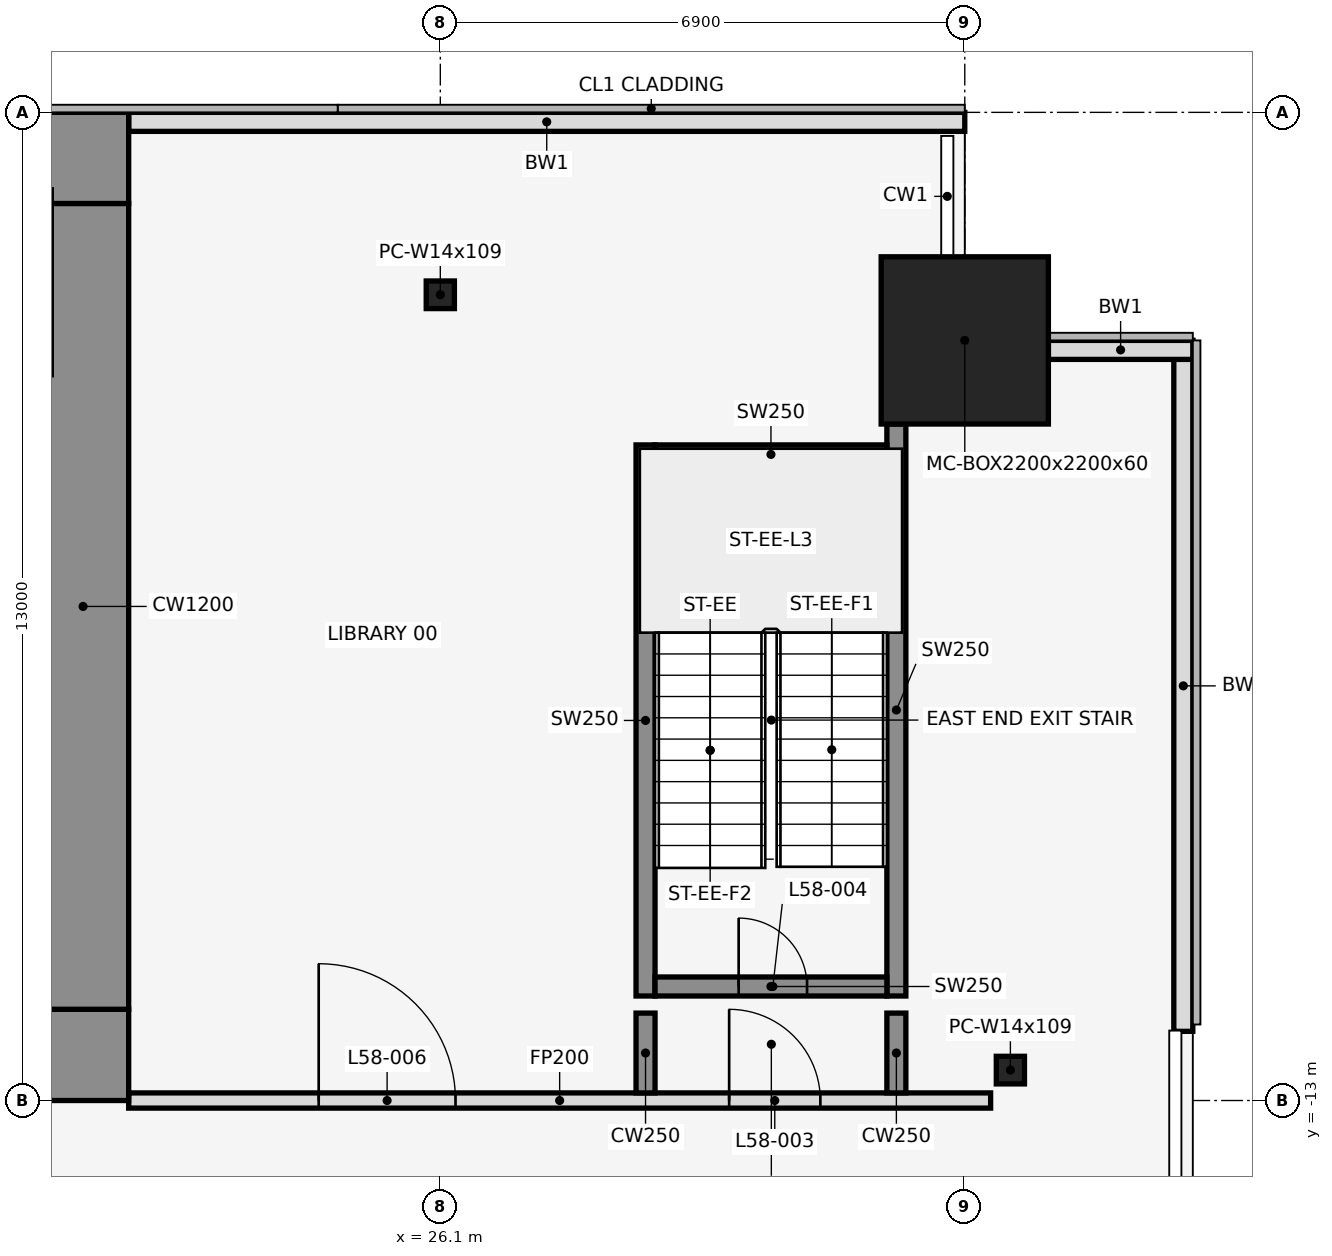
"""IFC4 building model, lengths in metres.
Left out: names, types, materials, properties, quantities, classifications, styles, units other than length and angle.
Written with IfcOpenShell. Run it as: python <this file> out.ifc"""

import sys

from ifc_helpers import new_model, si_unit, direction, frame, frame_2d, origin, origin_2d, place, context, subcontext, project, spatial, rectangle, hollow_rectangle, i_section, extrude, element, fill, save


model = new_model("IFC4")
c1 = context("Model", 3, precision=1e-05, world=origin(), true_north=direction((0.0, 1.0)))
c2 = subcontext(c1, "Body", "Model", "MODEL_VIEW")
j1 = project(units=[si_unit("LENGTHUNIT", "METRE"), si_unit("PLANEANGLEUNIT", "RADIAN")], contexts=[c1])
p1 = place(None, origin())
s1 = spatial("IfcSite", under=j1, at=p1, CompositionType="ELEMENT")
p2 = place(p1, origin())
s2 = spatial("IfcBuilding", under=s1, at=p2, CompositionType="ELEMENT")
p3 = place(p2, frame((0.0, 0.0, 258.2)))
s3 = spatial("IfcBuildingStorey", under=s2, at=p3, CompositionType="ELEMENT", Elevation=258.2)
p4 = place(p3, frame((26.1, -2.4, 0.0), z_axis=(0.0, 0.0, 1.0), x_axis=(1.0, 0.0, 0.0)))
e1 = element("IfcColumn", 1, at=p4, inside=s3, PredefinedType="COLUMN", context=c2, shape_type="SweptSolid", body=[
    extrude(i_section(OverallWidth=0.371, OverallDepth=0.363, WebThickness=0.013, FlangeThickness=0.022, at=origin_2d()), origin(), (0.0, 0.0, 1.0), 4.2),
])
p5 = place(p3, frame((33.0, -3.0, 0.0), z_axis=(0.0, 0.0, 1.0), x_axis=(1.0, 0.0, 0.0)))
e2 = element("IfcColumn", 2, at=p5, inside=s3, PredefinedType="COLUMN", context=c2, shape_type="SweptSolid", body=[
    extrude(hollow_rectangle(XDim=2.2, YDim=2.2, WallThickness=0.06, at=origin_2d()), origin(), (0.0, 0.0, 1.0), 4.2),
])
p6 = place(p3, frame((33.6, -12.6, 0.0), z_axis=(0.0, 0.0, 1.0), x_axis=(1.0, 0.0, 0.0)))
e3 = element("IfcColumn", 3, at=p6, inside=s3, PredefinedType="COLUMN", context=c2, shape_type="SweptSolid", body=[
    extrude(i_section(OverallWidth=0.371, OverallDepth=0.363, WebThickness=0.013, FlangeThickness=0.022, at=origin_2d()), origin(), (0.0, 0.0, 1.0), 4.2),
])
p7 = place(p3, frame((33.0, -0.125, 0.0), z_axis=(0.0, 0.0, 1.0), x_axis=(-1.0, 0.0, 0.0)))
e4 = element("IfcWall", 4, at=p7, inside=s3, PredefinedType="STANDARD", context=c2, shape_type="SweptSolid", body=[
    extrude(rectangle(XDim=11.0, YDim=0.25, at=frame_2d((5.5, 0.0))), origin(), (0.0, 0.0, 1.0), 4.05),
])
p8 = place(p3, frame((35.875, -12.09, 0.0), z_axis=(0.0, 0.0, 1.0), x_axis=(0.0, 1.0, 0.0)))
e5 = element("IfcWall", 5, at=p8, inside=s3, PredefinedType="STANDARD", context=c2, shape_type="SweptSolid", body=[
    extrude(rectangle(XDim=9.09, YDim=0.25, at=frame_2d((4.545, 0.0))), origin(), (0.0, 0.0, 1.0), 4.05),
])
p9 = place(p3, frame((36.0, -3.125, 0.0), z_axis=(0.0, 0.0, 1.0), x_axis=(-1.0, 0.0, 0.0)))
e6 = element("IfcWall", 6, at=p9, inside=s3, PredefinedType="STANDARD", context=c2, shape_type="SweptSolid", body=[
    extrude(rectangle(XDim=1.9, YDim=0.25, at=frame_2d((0.95, 0.0))), origin(), (0.0, 0.0, 1.0), 4.05),
])
p10 = place(p3, frame((28.8, -11.625, 0.0), z_axis=(0.0, 0.0, 1.0), x_axis=(0.0, 1.0, 0.0)))
e7 = element("IfcWall", 7, at=p10, inside=s3, PredefinedType="SHEAR", context=c2, shape_type="SweptSolid", body=[
    extrude(rectangle(XDim=7.25, YDim=0.25, at=frame_2d((3.625, 0.0))), origin(), (0.0, 0.0, 1.0), 4.2),
])
p11 = place(p3, frame((32.1, -11.625, 0.0), z_axis=(0.0, 0.0, 1.0), x_axis=(0.0, 1.0, 0.0)))
e8 = element("IfcWall", 8, at=p11, inside=s3, PredefinedType="SHEAR", context=c2, shape_type="SweptSolid", body=[
    extrude(rectangle(XDim=7.525, YDim=0.25, at=frame_2d((3.762, 0.0))), origin(), (0.0, 0.0, 1.0), 4.2),
])
p12 = place(p3, frame((28.925, -11.5, 0.0), z_axis=(0.0, 0.0, 1.0), x_axis=(1.0, 0.0, 0.0)))
e9 = element("IfcWall", 9, at=p12, inside=s3, PredefinedType="SHEAR", context=c2, shape_type="SweptSolid", body=[
    extrude(rectangle(XDim=3.05, YDim=0.25, at=frame_2d((1.525, 0.0))), origin(), (0.0, 0.0, 1.0), 4.2),
])
p13 = place(p12, frame((1.1, 0.0, 0.0)))
e10 = element("IfcOpeningElement", 10, at=p13, cuts=e9, PredefinedType="OPENING", context=c2, shape_type="SweptSolid", body=[
    extrude(rectangle(XDim=0.9, YDim=2.1, at=frame_2d((0.45, 1.05))), frame((0.0, 0.137, 0.0), z_axis=(0.0, -1.0, 0.0), x_axis=(1.0, 0.0, 0.0)), (0.0, 0.0, 1.0), 0.274),
])
p14 = place(p3, frame((28.925, -4.5, 0.0), z_axis=(0.0, 0.0, 1.0), x_axis=(1.0, 0.0, 0.0)))
e11 = element("IfcWall", 11, at=p14, inside=s3, PredefinedType="SHEAR", context=c2, shape_type="SweptSolid", body=[
    extrude(rectangle(XDim=3.05, YDim=0.25, at=frame_2d((1.525, 0.0))), origin(), (0.0, 0.0, 1.0), 4.2),
])
p15 = place(p3, frame((22.0, -13.0, 0.0), z_axis=(0.0, 0.0, 1.0), x_axis=(1.0, 0.0, 0.0)))
e12 = element("IfcWall", 12, at=p15, inside=s3, PredefinedType="PARTITIONING", context=c2, shape_type="SweptSolid", body=[
    extrude(rectangle(XDim=11.34, YDim=0.2, at=frame_2d((5.67, 0.0))), origin(), (0.0, 0.0, 1.0), 3.118),
])
p16 = place(p15, frame((7.9, 0.0, 0.0)))
e13 = element("IfcOpeningElement", 13, at=p16, cuts=e12, PredefinedType="OPENING", context=c2, shape_type="SweptSolid", body=[
    extrude(rectangle(XDim=1.2, YDim=2.1, at=frame_2d((0.6, 1.05))), frame((0.0, 0.112, 0.0), z_axis=(0.0, -1.0, 0.0), x_axis=(1.0, 0.0, 0.0)), (0.0, 0.0, 1.0), 0.224),
])
p17 = place(p15, frame((2.5, 0.0, 0.0)))
e14 = element("IfcOpeningElement", 14, at=p17, cuts=e12, PredefinedType="OPENING", context=c2, shape_type="SweptSolid", body=[
    extrude(rectangle(XDim=1.8, YDim=2.1, at=frame_2d((0.9, 1.05))), frame((0.0, 0.112, 0.0), z_axis=(0.0, -1.0, 0.0), x_axis=(1.0, 0.0, 0.0)), (0.0, 0.0, 1.0), 0.224),
])
for number, where, z_axis, x_axis in (
    (15, (28.8, -12.9, 0.0), (0.0, 0.0, 1.0), (0.0, 1.0, 0.0)),
    (16, (32.1, -12.9, 0.0), (0.0, 0.0, 1.0), (0.0, 1.0, 0.0)),
):
    element("IfcWall", number, at=place(p3, frame(where, z_axis=z_axis, x_axis=x_axis)), inside=s3, PredefinedType="SHEAR", context=c2, shape_type="SweptSolid", body=[
        extrude(rectangle(XDim=1.05, YDim=0.25, at=frame_2d((0.525, 0.0))), origin(), (0.0, 0.0, 1.0), 4.2),
    ])
p18 = place(p3, frame((-22.0, -0.6, 0.0), z_axis=(0.0, 0.0, 1.0), x_axis=(1.0, 0.0, 0.0)))
e17 = element("IfcWall", 17, at=p18, inside=s3, PredefinedType="SHEAR", context=c2, shape_type="SweptSolid", body=[
    extrude(rectangle(XDim=44.0, YDim=1.2, at=frame_2d((22.0, 0.0))), origin(), (0.0, 0.0, 1.0), 4.2),
])
p19 = place(p18, frame((18.55, 0.0, 0.0)))
e18 = element("IfcOpeningElement", 18, at=p19, cuts=e17, PredefinedType="OPENING", context=c2, shape_type="SweptSolid", body=[
    extrude(rectangle(XDim=0.9, YDim=2.1, at=frame_2d((0.45, 1.05))), frame((0.0, 0.612, 0.0), z_axis=(0.0, -1.0, 0.0), x_axis=(1.0, 0.0, 0.0)), (0.0, 0.0, 1.0), 1.224),
])
p20 = place(p18, frame((24.55, 0.0, 0.0)))
e19 = element("IfcOpeningElement", 19, at=p20, cuts=e17, PredefinedType="OPENING", context=c2, shape_type="SweptSolid", body=[
    extrude(rectangle(XDim=0.9, YDim=2.1, at=frame_2d((0.45, 1.05))), frame((0.0, 0.612, 0.0), z_axis=(0.0, -1.0, 0.0), x_axis=(1.0, 0.0, 0.0)), (0.0, 0.0, 1.0), 1.224),
])
p21 = place(p3, frame((-22.0, -12.4, 0.0), z_axis=(0.0, 0.0, 1.0), x_axis=(1.0, 0.0, 0.0)))
e20 = element("IfcWall", 20, at=p21, inside=s3, PredefinedType="SHEAR", context=c2, shape_type="SweptSolid", body=[
    extrude(rectangle(XDim=44.0, YDim=1.2, at=frame_2d((22.0, 0.0))), origin(), (0.0, 0.0, 1.0), 4.2),
])
p22 = place(p21, frame((2.2, 0.0, 0.0)))
e21 = element("IfcOpeningElement", 21, at=p22, cuts=e20, PredefinedType="OPENING", context=c2, shape_type="SweptSolid", body=[
    extrude(rectangle(XDim=1.2, YDim=2.1, at=frame_2d((0.6, 1.05))), frame((0.0, 0.612, 0.0), z_axis=(0.0, -1.0, 0.0), x_axis=(1.0, 0.0, 0.0)), (0.0, 0.0, 1.0), 1.224),
])
p23 = place(p21, frame((21.4, 0.0, 0.0)))
e22 = element("IfcOpeningElement", 22, at=p23, cuts=e20, PredefinedType="OPENING", context=c2, shape_type="SweptSolid", body=[
    extrude(rectangle(XDim=1.2, YDim=2.1, at=frame_2d((0.6, 1.05))), frame((0.0, 0.612, 0.0), z_axis=(0.0, -1.0, 0.0), x_axis=(1.0, 0.0, 0.0)), (0.0, 0.0, 1.0), 1.224),
])
p24 = place(p21, frame((40.6, 0.0, 0.0)))
e23 = element("IfcOpeningElement", 23, at=p24, cuts=e20, PredefinedType="OPENING", context=c2, shape_type="SweptSolid", body=[
    extrude(rectangle(XDim=1.2, YDim=2.1, at=frame_2d((0.6, 1.05))), frame((0.0, 0.612, 0.0), z_axis=(0.0, -1.0, 0.0), x_axis=(1.0, 0.0, 0.0)), (0.0, 0.0, 1.0), 1.224),
])
p25 = place(p21, frame((16.0, 0.0, 0.0)))
e24 = element("IfcOpeningElement", 24, at=p25, cuts=e20, PredefinedType="OPENING", context=c2, shape_type="SweptSolid", body=[
    extrude(rectangle(XDim=1.8, YDim=2.1, at=frame_2d((0.9, 1.05))), frame((0.0, 0.612, 0.0), z_axis=(0.0, -1.0, 0.0), x_axis=(1.0, 0.0, 0.0)), (0.0, 0.0, 1.0), 1.224),
])
p26 = place(p21, frame((6.3, 0.0, 0.0)))
e25 = element("IfcOpeningElement", 25, at=p26, cuts=e20, PredefinedType="OPENING", context=c2, shape_type="SweptSolid", body=[
    extrude(rectangle(XDim=1.2, YDim=2.1, at=frame_2d((0.6, 1.05))), frame((0.0, 0.612, 0.0), z_axis=(0.0, -1.0, 0.0), x_axis=(1.0, 0.0, 0.0)), (0.0, 0.0, 1.0), 1.224),
])
p27 = place(p21, frame((26.2, 0.0, 0.0)))
e26 = element("IfcOpeningElement", 26, at=p27, cuts=e20, PredefinedType="OPENING", context=c2, shape_type="SweptSolid", body=[
    extrude(rectangle(XDim=1.8, YDim=2.1, at=frame_2d((0.9, 1.05))), frame((0.0, 0.612, 0.0), z_axis=(0.0, -1.0, 0.0), x_axis=(1.0, 0.0, 0.0)), (0.0, 0.0, 1.0), 1.224),
])
p28 = place(p21, frame((36.5, 0.0, 0.0)))
e27 = element("IfcOpeningElement", 27, at=p28, cuts=e20, PredefinedType="OPENING", context=c2, shape_type="SweptSolid", body=[
    extrude(rectangle(XDim=1.2, YDim=2.1, at=frame_2d((0.6, 1.05))), frame((0.0, 0.612, 0.0), z_axis=(0.0, -1.0, 0.0), x_axis=(1.0, 0.0, 0.0)), (0.0, 0.0, 1.0), 1.224),
])
p29 = place(p3, frame((21.4, -11.8, 0.0), z_axis=(0.0, 0.0, 1.0), x_axis=(0.0, 1.0, 0.0)))
e28 = element("IfcWall", 28, at=p29, inside=s3, PredefinedType="SHEAR", context=c2, shape_type="SweptSolid", body=[
    extrude(rectangle(XDim=10.6, YDim=1.2, at=frame_2d((5.3, 0.0))), origin(), (0.0, 0.0, 1.0), 4.2),
])
p30 = place(p16, origin())
e29 = element("IfcDoor", 29, at=p30, inside=s3, OperationType="SINGLE_SWING_RIGHT", PredefinedType="DOOR", context=c2, shape_type="SweptSolid", body=[
    extrude(rectangle(XDim=1.2, YDim=2.1, at=frame_2d((0.6, 1.05))), frame((0.0, 0.025, 0.0), z_axis=(0.0, -1.0, 0.0), x_axis=(1.0, 0.0, 0.0)), (0.0, 0.0, 1.0), 0.05),
])
fill(e13, e29)
p31 = place(p13, origin())
e30 = element("IfcDoor", 30, at=p31, inside=s3, OperationType="SINGLE_SWING_LEFT", PredefinedType="DOOR", context=c2, shape_type="SweptSolid", body=[
    extrude(rectangle(XDim=0.9, YDim=2.1, at=frame_2d((0.45, 1.05))), frame((0.0, 0.025, 0.0), z_axis=(0.0, -1.0, 0.0), x_axis=(1.0, 0.0, 0.0)), (0.0, 0.0, 1.0), 0.05),
])
fill(e10, e30)
p32 = place(p17, origin())
e31 = element("IfcDoor", 31, at=p32, inside=s3, OperationType="SINGLE_SWING_LEFT", PredefinedType="DOOR", context=c2, shape_type="SweptSolid", body=[
    extrude(rectangle(XDim=1.8, YDim=2.1, at=frame_2d((0.9, 1.05))), frame((0.0, 0.025, 0.0), z_axis=(0.0, -1.0, 0.0), x_axis=(1.0, 0.0, 0.0)), (0.0, 0.0, 1.0), 0.05),
])
fill(e14, e31)
save(model, sys.argv[1])
